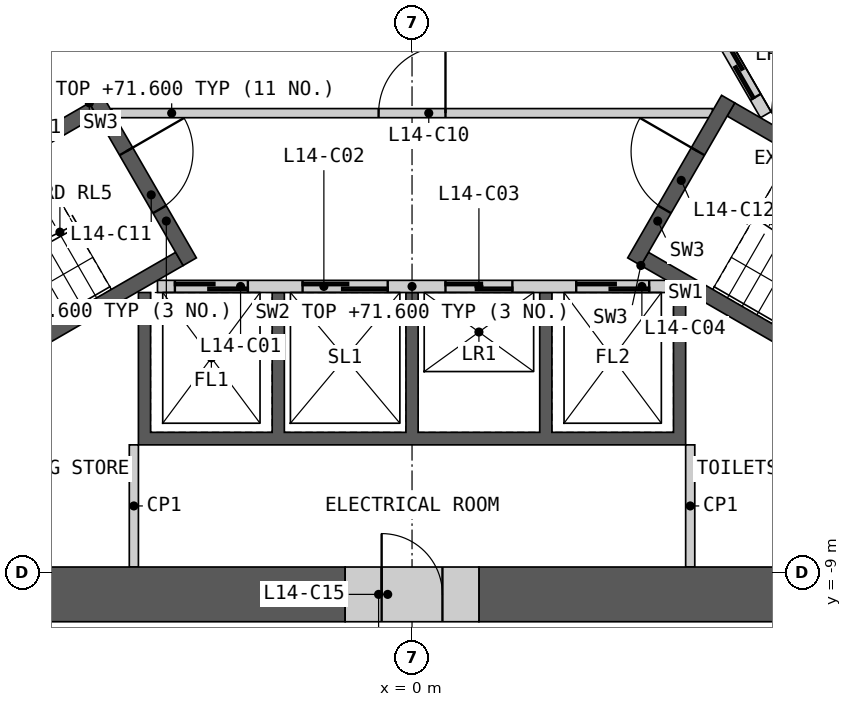
"""IFC4 building model, lengths in metres.
Left out: names, types, materials, properties, quantities, classifications, styles, units other than length and angle.
Written with IfcOpenShell. Run it as: python <this file> out.ifc"""

import sys

from ifc_helpers import new_model, si_unit, direction, frame, frame_2d, origin, place, context, subcontext, project, spatial, polyline, rectangle, outline, extrude, element, fill, save


model = new_model("IFC4")
c1 = context("Model", 3, precision=1e-05, world=origin(), true_north=direction((0.0, 1.0)))
c2 = subcontext(c1, "Body", "Model", "MODEL_VIEW")
j1 = project(units=[si_unit("LENGTHUNIT", "METRE"), si_unit("PLANEANGLEUNIT", "RADIAN")], contexts=[c1])
p1 = place(None, origin())
s1 = spatial("IfcSite", under=j1, at=p1, CompositionType="ELEMENT")
p2 = place(p1, origin())
s2 = spatial("IfcBuilding", under=s1, at=p2, CompositionType="ELEMENT")
p3 = place(p2, frame((0.0, 0.0, 67.8)))
s3 = spatial("IfcBuildingStorey", under=s2, at=p3, CompositionType="ELEMENT", Elevation=67.8)
p4 = place(p3, origin())
e1 = element("IfcWall", 1, at=p4, inside=s3, PredefinedType="SHEAR", context=c2, shape_type="SweptSolid", body=[
    extrude(outline(polyline([(4.5, -4.4), (4.5, -6.906), (-4.5, -6.906), (-4.5, -4.4), (-4.3, -4.4), (-4.3, -6.7), (-2.3, -6.7), (-2.3, -4.4), (-2.1, -4.4), (-2.1, -6.7), (-0.1, -6.7), (-0.1, -4.4), (0.1, -4.4), (0.1, -6.7), (2.1, -6.7), (2.1, -4.4), (2.3, -4.4), (2.3, -6.7), (4.3, -6.7), (4.3, -4.4), (4.5, -4.4)])), origin(), (0.0, 0.0, 1.0), 3.8),
])
p5 = place(p3, frame((-4.187, -4.3, 0.0), z_axis=(0.0, 0.0, 1.0), x_axis=(1.0, 0.0, 0.0)))
e2 = element("IfcWall", 2, at=p5, inside=s3, PredefinedType="SOLIDWALL", context=c2, shape_type="SweptSolid", body=[
    extrude(rectangle(XDim=8.373, YDim=0.2, at=frame_2d((4.187, 0.0))), origin(), (0.0, 0.0, 1.0), 3.8),
])
p6 = place(p5, frame((0.287, 0.0, 0.0)))
e3 = element("IfcOpeningElement", 3, at=p6, cuts=e2, PredefinedType="OPENING", context=c2, shape_type="SweptSolid", body=[
    extrude(rectangle(XDim=1.2, YDim=2.1, at=frame_2d((0.6, 1.05))), frame((0.0, 0.11, 0.0), z_axis=(0.0, -1.0, 0.0), x_axis=(1.0, 0.0, 0.0)), (0.0, 0.0, 1.0), 0.22),
])
p7 = place(p5, frame((2.387, 0.0, 0.0)))
e4 = element("IfcOpeningElement", 4, at=p7, cuts=e2, PredefinedType="OPENING", context=c2, shape_type="SweptSolid", body=[
    extrude(rectangle(XDim=1.4, YDim=2.1, at=frame_2d((0.7, 1.05))), frame((0.0, 0.11, 0.0), z_axis=(0.0, -1.0, 0.0), x_axis=(1.0, 0.0, 0.0)), (0.0, 0.0, 1.0), 0.22),
])
p8 = place(p5, frame((4.737, 0.0, 0.0)))
e5 = element("IfcOpeningElement", 5, at=p8, cuts=e2, PredefinedType="OPENING", context=c2, shape_type="SweptSolid", body=[
    extrude(rectangle(XDim=1.1, YDim=2.1, at=frame_2d((0.55, 1.05))), frame((0.0, 0.11, 0.0), z_axis=(0.0, -1.0, 0.0), x_axis=(1.0, 0.0, 0.0)), (0.0, 0.0, 1.0), 0.22),
])
p9 = place(p5, frame((6.887, 0.0, 0.0)))
e6 = element("IfcOpeningElement", 6, at=p9, cuts=e2, PredefinedType="OPENING", context=c2, shape_type="SweptSolid", body=[
    extrude(rectangle(XDim=1.2, YDim=2.1, at=frame_2d((0.6, 1.05))), frame((0.0, 0.11, 0.0), z_axis=(0.0, -1.0, 0.0), x_axis=(1.0, 0.0, 0.0)), (0.0, 0.0, 1.0), 0.22),
])
p10 = place(p3, origin())
e7 = element("IfcWall", 7, at=p10, inside=s3, PredefinedType="SHEAR", context=c2, shape_type="SweptSolid", body=[
    extrude(outline(polyline([(2.66, 4.192), (4.831, 5.445), (8.231, -0.444), (6.061, -1.697), (5.96, -1.524), (7.952, -0.374), (6.952, 1.358), (4.96, 0.208), (4.861, 0.381), (6.852, 1.531), (5.852, 3.263), (3.861, 2.113), (3.76, 2.287), (5.752, 3.437), (4.752, 5.169), (2.76, 4.019), (2.66, 4.192)])), origin(), (0.0, 0.0, 1.0), 3.8),
])
p11 = place(p3, frame((5.817, -1.476, 0.0), z_axis=(0.0, 0.0, 1.0), x_axis=(-0.500002616675, 0.866023893041, 0.0)))
e8 = element("IfcWall", 8, at=p11, inside=s3, PredefinedType="SOLIDWALL", context=c2, shape_type="SweptSolid", body=[
    extrude(rectangle(XDim=8.373, YDim=0.2, at=frame_2d((4.187, 0.0))), origin(), (0.0, 0.0, 1.0), 3.8),
])
p12 = place(p11, frame((0.337, 0.0, 0.0)))
e9 = element("IfcOpeningElement", 9, at=p12, cuts=e8, PredefinedType="OPENING", context=c2, shape_type="SweptSolid", body=[
    extrude(rectangle(XDim=1.1, YDim=2.1, at=frame_2d((0.55, 1.05))), frame((0.0, 0.11, 0.0), z_axis=(0.0, -1.0, 0.0), x_axis=(1.0, 0.0, 0.0)), (0.0, 0.0, 1.0), 0.22),
])
p13 = place(p11, frame((2.537, 0.0, 0.0)))
e10 = element("IfcOpeningElement", 10, at=p13, cuts=e8, PredefinedType="OPENING", context=c2, shape_type="SweptSolid", body=[
    extrude(rectangle(XDim=1.1, YDim=2.1, at=frame_2d((0.55, 1.05))), frame((0.0, 0.11, 0.0), z_axis=(0.0, -1.0, 0.0), x_axis=(1.0, 0.0, 0.0)), (0.0, 0.0, 1.0), 0.22),
])
p14 = place(p11, frame((4.737, 0.0, 0.0)))
e11 = element("IfcOpeningElement", 11, at=p14, cuts=e8, PredefinedType="OPENING", context=c2, shape_type="SweptSolid", body=[
    extrude(rectangle(XDim=1.1, YDim=2.1, at=frame_2d((0.55, 1.05))), frame((0.0, 0.11, 0.0), z_axis=(0.0, -1.0, 0.0), x_axis=(1.0, 0.0, 0.0)), (0.0, 0.0, 1.0), 0.22),
])
p15 = place(p11, frame((7.037, 0.0, 0.0)))
e12 = element("IfcOpeningElement", 12, at=p15, cuts=e8, PredefinedType="OPENING", context=c2, shape_type="SweptSolid", body=[
    extrude(rectangle(XDim=0.9, YDim=2.1, at=frame_2d((0.45, 1.05))), frame((0.0, 0.11, 0.0), z_axis=(0.0, -1.0, 0.0), x_axis=(1.0, 0.0, 0.0)), (0.0, 0.0, 1.0), 0.22),
])
p16 = place(p3, frame((-4.941, -1.45, 0.0), z_axis=(0.0, 0.0, 1.0), x_axis=(1.0, 0.0, 0.0)))
e13 = element("IfcWall", 13, at=p16, inside=s3, PredefinedType="PARTITIONING", context=c2, shape_type="SweptSolid", body=[
    extrude(rectangle(XDim=9.882, YDim=0.15, at=frame_2d((4.941, 0.0))), origin(), (0.0, 0.0, 1.0), 3.8),
])
p17 = place(p16, frame((4.391, 0.0, 0.0)))
e14 = element("IfcOpeningElement", 14, at=p17, cuts=e13, PredefinedType="OPENING", context=c2, shape_type="SweptSolid", body=[
    extrude(rectangle(XDim=1.1, YDim=2.1, at=frame_2d((0.55, 1.05))), frame((0.0, 0.085, 0.0), z_axis=(0.0, -1.0, 0.0), x_axis=(1.0, 0.0, 0.0)), (0.0, 0.0, 1.0), 0.17),
])
p18 = place(p3, origin())
e15 = element("IfcWall", 15, at=p18, inside=s3, PredefinedType="SHEAR", context=c2, shape_type="SweptSolid", body=[
    extrude(outline(polyline([(-5.307, -1.281), (-10.374, -4.206), (-10.032, -4.298), (-5.182, -1.498), (-5.307, -1.281)])), origin(), (0.0, 0.0, 1.0), 3.8),
])
p19 = place(p3, origin())
e16 = element("IfcWall", 16, at=p19, inside=s3, PredefinedType="SHEAR", context=c2, shape_type="SweptSolid", body=[
    extrude(outline(polyline([(-8.738, -6.539), (-8.83, -6.881), (-3.763, -3.956), (-3.888, -3.739), (-8.738, -6.539)])), origin(), (0.0, 0.0, 1.0), 3.8),
])
p20 = place(p3, frame((-5.199, -1.219, 0.0), z_axis=(0.0, 0.0, 1.0), x_axis=(0.499982516597, -0.866035497597, 0.0)))
e17 = element("IfcWall", 17, at=p20, inside=s3, PredefinedType="SHEAR", context=c2, shape_type="SweptSolid", body=[
    extrude(rectangle(XDim=3.088, YDim=0.25, at=frame_2d((1.544, 0.0))), origin(), (0.0, 0.0, 1.0), 3.8),
])
p21 = place(p20, frame((0.994, 0.0, 0.0)))
e18 = element("IfcOpeningElement", 18, at=p21, cuts=e17, PredefinedType="OPENING", context=c2, shape_type="SweptSolid", body=[
    extrude(rectangle(XDim=1.1, YDim=2.1, at=frame_2d((0.55, 1.05))), frame((0.0, 0.135, 0.0), z_axis=(0.0, -1.0, 0.0), x_axis=(1.0, 0.0, 0.0)), (0.0, 0.0, 1.0), 0.27),
])
p22 = place(p3, origin())
e19 = element("IfcWall", 19, at=p22, inside=s3, PredefinedType="SHEAR", context=c2, shape_type="SweptSolid", body=[
    extrude(outline(polyline([(3.763, -3.956), (8.83, -6.881), (8.738, -6.539), (3.888, -3.739), (3.763, -3.956)])), origin(), (0.0, 0.0, 1.0), 3.8),
])
p23 = place(p3, origin())
e20 = element("IfcWall", 20, at=p23, inside=s3, PredefinedType="SHEAR", context=c2, shape_type="SweptSolid", body=[
    extrude(outline(polyline([(10.032, -4.298), (10.374, -4.206), (5.307, -1.281), (5.182, -1.498), (10.032, -4.298)])), origin(), (0.0, 0.0, 1.0), 3.8),
])
p24 = place(p3, frame((3.655, -3.893, 0.0), z_axis=(0.0, 0.0, 1.0), x_axis=(0.499982516597, 0.866035497597, 0.0)))
e21 = element("IfcWall", 21, at=p24, inside=s3, PredefinedType="SHEAR", context=c2, shape_type="SweptSolid", body=[
    extrude(rectangle(XDim=3.088, YDim=0.25, at=frame_2d((1.544, 0.0))), origin(), (0.0, 0.0, 1.0), 3.8),
])
p25 = place(p24, frame((0.994, 0.0, 0.0)))
e22 = element("IfcOpeningElement", 22, at=p25, cuts=e21, PredefinedType="OPENING", context=c2, shape_type="SweptSolid", body=[
    extrude(rectangle(XDim=1.1, YDim=2.1, at=frame_2d((0.55, 1.05))), frame((0.0, 0.135, 0.0), z_axis=(0.0, -1.0, 0.0), x_axis=(1.0, 0.0, 0.0)), (0.0, 0.0, 1.0), 0.27),
])
for number, where, z_axis, x_axis in (
    (23, (4.575, -6.906, 0.0), (0.0, 0.0, 1.0), (0.0, -1.0, 0.0)),
    (24, (-4.575, -6.906, 0.0), (0.0, 0.0, 1.0), (0.0, -1.0, 0.0)),
):
    element("IfcWall", number, at=place(p3, frame(where, z_axis=z_axis, x_axis=x_axis)), inside=s3, PredefinedType="PARTITIONING", context=c2, shape_type="SweptSolid", body=[
        extrude(rectangle(XDim=2.009, YDim=0.15, at=frame_2d((1.004, 0.0))), origin(), (0.0, 0.0, 1.0), 3.8),
    ])
p26 = place(p3, frame((-11.179, -9.365, 0.0), z_axis=(0.0, 0.0, 1.0), x_axis=(1.0, 0.0, 0.0)))
e25 = element("IfcWall", 25, at=p26, inside=s3, PredefinedType="SHEAR", context=c2, shape_type="SweptSolid", body=[
    extrude(rectangle(XDim=10.079, YDim=0.9, at=frame_2d((5.04, 0.0))), origin(), (0.0, 0.0, 1.0), 3.8),
])
p27 = place(p3, frame((1.1, -9.365, 0.0), z_axis=(0.0, 0.0, 1.0), x_axis=(1.0, 0.0, 0.0)))
e26 = element("IfcWall", 26, at=p27, inside=s3, PredefinedType="SHEAR", context=c2, shape_type="SweptSolid", body=[
    extrude(rectangle(XDim=6.189, YDim=0.9, at=frame_2d((3.095, 0.0))), origin(), (0.0, 0.0, 1.0), 3.8),
])
p28 = place(p3, frame((-1.1, -9.365, 0.0), z_axis=(0.0, 0.0, 1.0), x_axis=(1.0, 0.0, 0.0)))
e27 = element("IfcWall", 27, at=p28, inside=s3, PredefinedType="SHEAR", context=c2, shape_type="SweptSolid", body=[
    extrude(rectangle(XDim=2.2, YDim=0.9, at=frame_2d((1.1, 0.0))), origin(), (0.0, 0.0, 1.0), 3.8),
])
p29 = place(p28, frame((0.6, 0.0, 0.0)))
e28 = element("IfcOpeningElement", 28, at=p29, cuts=e27, PredefinedType="OPENING", context=c2, shape_type="SweptSolid", body=[
    extrude(rectangle(XDim=1.0, YDim=2.1, at=frame_2d((0.5, 1.05))), frame((0.0, 0.46, 0.0), z_axis=(0.0, -1.0, 0.0), x_axis=(1.0, 0.0, 0.0)), (0.0, 0.0, 1.0), 0.92),
])
p30 = place(p6, origin())
e29 = element("IfcDoor", 29, at=p30, inside=s3, OperationType="SLIDING_TO_LEFT", PredefinedType="DOOR", context=c2, shape_type="SweptSolid", body=[
    extrude(rectangle(XDim=1.2, YDim=2.1, at=frame_2d((0.6, 1.05))), frame((0.0, 0.025, 0.0), z_axis=(0.0, -1.0, 0.0), x_axis=(1.0, 0.0, 0.0)), (0.0, 0.0, 1.0), 0.05),
])
fill(e3, e29)
p31 = place(p7, origin())
e30 = element("IfcDoor", 30, at=p31, inside=s3, OperationType="SLIDING_TO_LEFT", PredefinedType="DOOR", context=c2, shape_type="SweptSolid", body=[
    extrude(rectangle(XDim=1.4, YDim=2.1, at=frame_2d((0.7, 1.05))), frame((0.0, 0.025, 0.0), z_axis=(0.0, -1.0, 0.0), x_axis=(1.0, 0.0, 0.0)), (0.0, 0.0, 1.0), 0.05),
])
fill(e4, e30)
p32 = place(p8, origin())
e31 = element("IfcDoor", 31, at=p32, inside=s3, OperationType="SLIDING_TO_LEFT", PredefinedType="DOOR", context=c2, shape_type="SweptSolid", body=[
    extrude(rectangle(XDim=1.1, YDim=2.1, at=frame_2d((0.55, 1.05))), frame((0.0, 0.025, 0.0), z_axis=(0.0, -1.0, 0.0), x_axis=(1.0, 0.0, 0.0)), (0.0, 0.0, 1.0), 0.05),
])
fill(e5, e31)
p33 = place(p9, origin())
e32 = element("IfcDoor", 32, at=p33, inside=s3, OperationType="SLIDING_TO_LEFT", PredefinedType="DOOR", context=c2, shape_type="SweptSolid", body=[
    extrude(rectangle(XDim=1.2, YDim=2.1, at=frame_2d((0.6, 1.05))), frame((0.0, 0.025, 0.0), z_axis=(0.0, -1.0, 0.0), x_axis=(1.0, 0.0, 0.0)), (0.0, 0.0, 1.0), 0.05),
])
fill(e6, e32)
p34 = place(p12, origin())
e33 = element("IfcDoor", 33, at=p34, inside=s3, OperationType="SLIDING_TO_LEFT", PredefinedType="DOOR", context=c2, shape_type="SweptSolid", body=[
    extrude(rectangle(XDim=1.1, YDim=2.1, at=frame_2d((0.55, 1.05))), frame((0.0, 0.025, 0.0), z_axis=(0.0, -1.0, 0.0), x_axis=(1.0, 0.0, 0.0)), (0.0, 0.0, 1.0), 0.05),
])
fill(e9, e33)
p35 = place(p17, origin())
e34 = element("IfcDoor", 34, at=p35, inside=s3, OperationType="SINGLE_SWING_RIGHT", PredefinedType="DOOR", context=c2, shape_type="SweptSolid", body=[
    extrude(rectangle(XDim=1.1, YDim=2.1, at=frame_2d((0.55, 1.05))), frame((0.0, 0.025, 0.0), z_axis=(0.0, -1.0, 0.0), x_axis=(1.0, 0.0, 0.0)), (0.0, 0.0, 1.0), 0.05),
])
fill(e14, e34)
p36 = place(p21, origin())
e35 = element("IfcDoor", 35, at=p36, inside=s3, OperationType="SINGLE_SWING_LEFT", PredefinedType="DOOR", context=c2, shape_type="SweptSolid", body=[
    extrude(rectangle(XDim=1.1, YDim=2.1, at=frame_2d((0.55, 1.05))), frame((0.0, 0.025, 0.0), z_axis=(0.0, -1.0, 0.0), x_axis=(1.0, 0.0, 0.0)), (0.0, 0.0, 1.0), 0.05),
])
fill(e18, e35)
p37 = place(p25, origin())
e36 = element("IfcDoor", 36, at=p37, inside=s3, OperationType="SINGLE_SWING_RIGHT", PredefinedType="DOOR", context=c2, shape_type="SweptSolid", body=[
    extrude(rectangle(XDim=1.1, YDim=2.1, at=frame_2d((0.55, 1.05))), frame((0.0, 0.025, 0.0), z_axis=(0.0, -1.0, 0.0), x_axis=(1.0, 0.0, 0.0)), (0.0, 0.0, 1.0), 0.05),
])
fill(e22, e36)
p38 = place(p29, origin())
e37 = element("IfcDoor", 37, at=p38, inside=s3, OperationType="SINGLE_SWING_LEFT", PredefinedType="DOOR", context=c2, shape_type="SweptSolid", body=[
    extrude(rectangle(XDim=1.0, YDim=2.1, at=frame_2d((0.5, 1.05))), frame((0.0, 0.205, 0.0), z_axis=(0.0, -1.0, 0.0), x_axis=(1.0, 0.0, 0.0)), (0.0, 0.0, 1.0), 0.05),
])
fill(e28, e37)
save(model, sys.argv[1])
